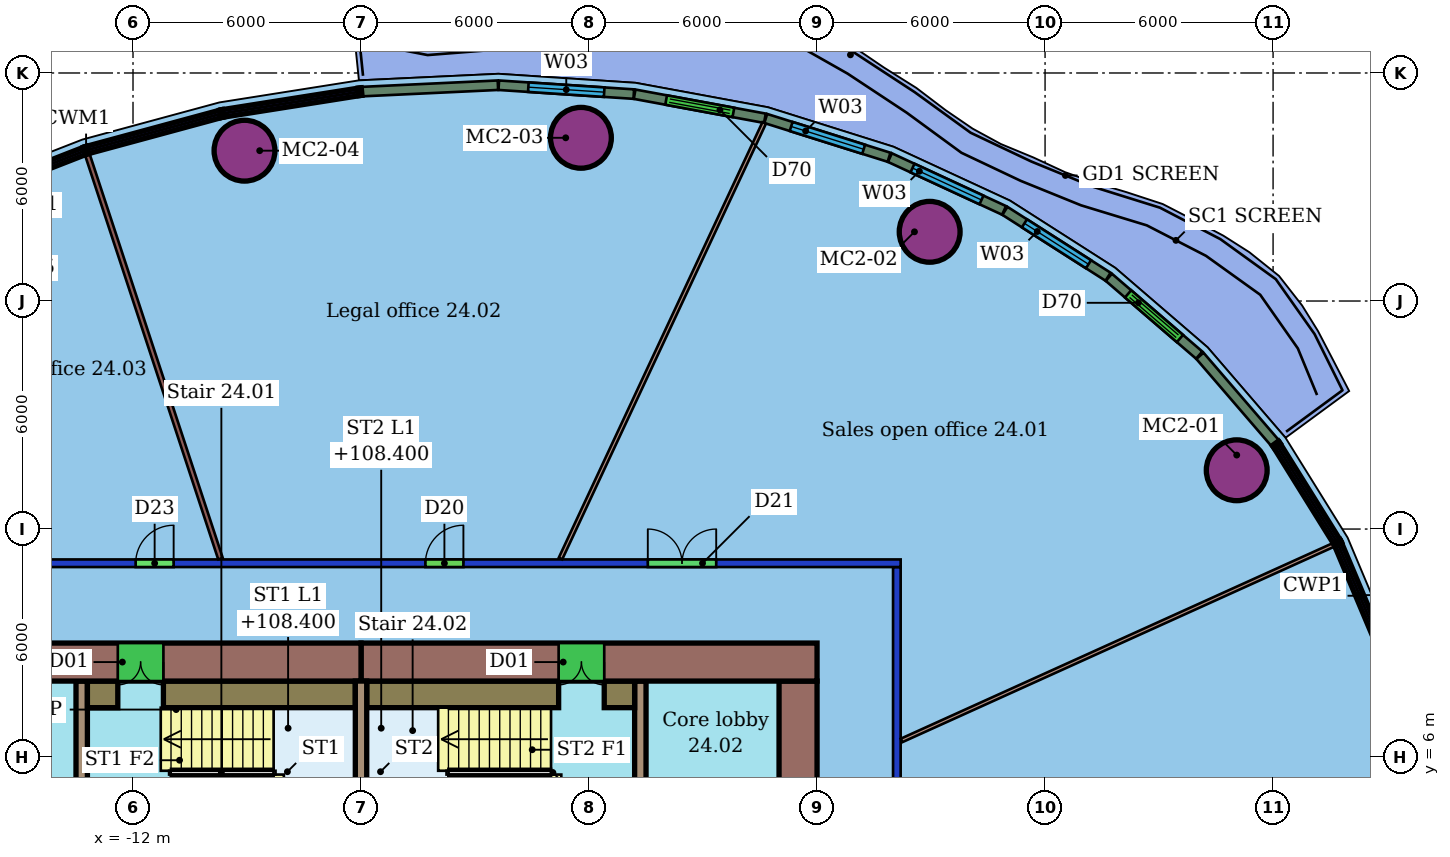
"""IFC4 building model, lengths in metres.
Left out: names, types, materials, properties, quantities, classifications, styles, units other than length and angle.
Written with IfcOpenShell. Run it as: python <this file> out.ifc"""

import sys

from ifc_helpers import new_model, si_unit, direction, frame, frame_2d, origin, origin_2d, place, context, subcontext, project, spatial, rectangle, hollow_circle, extrude, element, fill, save


model = new_model("IFC4")
c1 = context("Model", 3, precision=1e-05, world=origin(), true_north=direction((0.0, 1.0)))
c2 = subcontext(c1, "Body", "Model", "MODEL_VIEW")
j1 = project(units=[si_unit("LENGTHUNIT", "METRE"), si_unit("PLANEANGLEUNIT", "RADIAN")], contexts=[c1])
p1 = place(None, origin())
s1 = spatial("IfcSite", under=j1, at=p1, CompositionType="ELEMENT")
p2 = place(p1, origin())
s2 = spatial("IfcBuilding", under=s1, at=p2, CompositionType="ELEMENT")
p3 = place(p2, frame((0.0, 0.0, 106.6)))
s3 = spatial("IfcBuildingStorey", under=s2, at=p3, CompositionType="ELEMENT", Elevation=106.6)
for number, where, z_axis, x_axis in (
    (1, (17.043, 13.547, 0.0), (0.0, 0.0, 1.0), (1.0, 0.0, 0.0)),
    (2, (8.963, 19.821, 0.0), (0.0, 0.0, 1.0), (1.0, 0.0, 0.0)),
    (3, (-0.213, 22.294, 0.0), (0.0, 0.0, 1.0), (1.0, 0.0, 0.0)),
    (4, (-9.066, 21.956, 0.0), (0.0, 0.0, 1.0), (1.0, 0.0, 0.0)),
):
    element("IfcColumn", number, at=place(p3, frame(where, z_axis=z_axis, x_axis=x_axis)), inside=s3, PredefinedType="COLUMN", context=c2, shape_type="SweptSolid", body=[
        extrude(hollow_circle(Radius=0.8, WallThickness=0.055, at=origin_2d()), origin(), (0.0, 0.0, 1.0), 3.45),
    ])
p4 = place(p3, frame((-20.2, 11.1, 0.0), z_axis=(0.0, 0.0, 1.0), x_axis=(1.0, 0.0, 0.0)))
e5 = element("IfcWall", 5, at=p4, inside=s3, PredefinedType="PARTITIONING", context=c2, shape_type="SweptSolid", body=[
    extrude(rectangle(XDim=28.4, YDim=0.2, at=frame_2d((14.2, 0.0))), origin(), (0.0, 0.0, 1.0), 3.0),
])
p5 = place(p4, frame((21.746, 0.0, 0.0)))
e6 = element("IfcOpeningElement", 6, at=p5, cuts=e5, PredefinedType="OPENING", context=c2, shape_type="SweptSolid", body=[
    extrude(rectangle(XDim=1.8, YDim=2.1, at=frame_2d((0.9, 1.05))), frame((0.0, 0.11, 0.0), z_axis=(0.0, -1.0, 0.0), x_axis=(1.0, 0.0, 0.0)), (0.0, 0.0, 1.0), 0.22),
])
p6 = place(p4, frame((15.894, 0.0, 0.0)))
e7 = element("IfcOpeningElement", 7, at=p6, cuts=e5, PredefinedType="OPENING", context=c2, shape_type="SweptSolid", body=[
    extrude(rectangle(XDim=1.0, YDim=2.1, at=frame_2d((0.5, 1.05))), frame((0.0, 0.11, 0.0), z_axis=(0.0, -1.0, 0.0), x_axis=(1.0, 0.0, 0.0)), (0.0, 0.0, 1.0), 0.22),
])
p7 = place(p4, frame((8.27, 0.0, 0.0)))
e8 = element("IfcOpeningElement", 8, at=p7, cuts=e5, PredefinedType="OPENING", context=c2, shape_type="SweptSolid", body=[
    extrude(rectangle(XDim=1.0, YDim=2.4, at=frame_2d((0.5, 1.2))), frame((0.0, 0.11, 0.0), z_axis=(0.0, -1.0, 0.0), x_axis=(1.0, 0.0, 0.0)), (0.0, 0.0, 1.0), 0.22),
])
p8 = place(p4, frame((3.349, 0.0, 0.0)))
e9 = element("IfcOpeningElement", 9, at=p8, cuts=e5, PredefinedType="OPENING", context=c2, shape_type="SweptSolid", body=[
    extrude(rectangle(XDim=0.9, YDim=2.1, at=frame_2d((0.45, 1.05))), frame((0.0, 0.11, 0.0), z_axis=(0.0, -1.0, 0.0), x_axis=(1.0, 0.0, 0.0)), (0.0, 0.0, 1.0), 0.22),
])
p9 = place(p3, frame((8.1, 11.0, 0.0), z_axis=(0.0, 0.0, 1.0), x_axis=(0.0, -1.0, 0.0)))
e10 = element("IfcWall", 10, at=p9, inside=s3, PredefinedType="PARTITIONING", context=c2, shape_type="SweptSolid", body=[
    extrude(rectangle(XDim=22.0, YDim=0.2, at=frame_2d((11.0, 0.0))), origin(), (0.0, 0.0, 1.0), 3.0),
])
p10 = place(p9, frame((14.236, 0.0, 0.0)))
e11 = element("IfcOpeningElement", 11, at=p10, cuts=e10, PredefinedType="OPENING", context=c2, shape_type="SweptSolid", body=[
    extrude(rectangle(XDim=1.5, YDim=2.1, at=frame_2d((0.75, 1.05))), frame((0.0, 0.11, 0.0), z_axis=(0.0, -1.0, 0.0), x_axis=(1.0, 0.0, 0.0)), (0.0, 0.0, 1.0), 0.22),
])
p11 = place(p9, frame((6.648, 0.0, 0.0)))
e12 = element("IfcOpeningElement", 12, at=p11, cuts=e10, PredefinedType="OPENING", context=c2, shape_type="SweptSolid", body=[
    extrude(rectangle(XDim=1.8, YDim=2.1, at=frame_2d((0.9, 1.05))), frame((0.0, 0.11, 0.0), z_axis=(0.0, -1.0, 0.0), x_axis=(1.0, 0.0, 0.0)), (0.0, 0.0, 1.0), 0.22),
])
p12 = place(p3, frame((19.584, 11.58, 0.0), z_axis=(0.0, 0.0, 1.0), x_axis=(-0.911028274582, -0.412343889142, 0.0)))
e13 = element("IfcWall", 13, at=p12, inside=s3, PredefinedType="PARTITIONING", context=c2, shape_type="SweptSolid", body=[
    extrude(rectangle(XDim=12.473, YDim=0.1, at=frame_2d((6.236, 0.0))), origin(), (0.0, 0.0, 1.0), 3.45),
])
p13 = place(p3, frame((4.609, 22.685, 0.0), z_axis=(0.0, 0.0, 1.0), x_axis=(-0.423609796587, -0.90584476608, 0.0)))
e14 = element("IfcWall", 14, at=p13, inside=s3, PredefinedType="PARTITIONING", context=c2, shape_type="SweptSolid", body=[
    extrude(rectangle(XDim=12.656, YDim=0.1, at=frame_2d((6.328, 0.0))), origin(), (0.0, 0.0, 1.0), 3.45),
])
p14 = place(p3, frame((-13.199, 21.845, 0.0), z_axis=(0.0, 0.0, 1.0), x_axis=(0.31298520813, -0.949758000489, 0.0)))
e15 = element("IfcWall", 15, at=p14, inside=s3, PredefinedType="PARTITIONING", context=c2, shape_type="SweptSolid", body=[
    extrude(rectangle(XDim=11.187, YDim=0.125, at=frame_2d((5.594, 0.0))), origin(), (0.0, 0.0, 1.0), 3.45),
])
p15 = place(p3, frame((18.05, 14.265, 0.0), z_axis=(0.0, 0.0, 1.0), x_axis=(-0.652642781227, 0.757665757516, 0.0)))
e16 = element("IfcWall", 16, at=p15, inside=s3, PredefinedType="SOLIDWALL", context=c2, shape_type="SweptSolid", body=[
    extrude(rectangle(XDim=3.027, YDim=0.25, at=frame_2d((1.513, 0.0))), origin(), (0.0, 0.0, 1.0), 3.05),
])
p16 = place(p3, frame((16.056, 16.577, 0.0), z_axis=(0.0, 0.0, 1.0), x_axis=(-0.757892764479, 0.652379151683, 0.0)))
e17 = element("IfcWall", 17, at=p16, inside=s3, PredefinedType="SOLIDWALL", context=c2, shape_type="SweptSolid", body=[
    extrude(rectangle(XDim=3.137, YDim=0.25, at=frame_2d((1.569, 0.0))), origin(), (0.0, 0.0, 1.0), 3.05),
])
p17 = place(p16, frame((0.669, 0.0, 0.0)))
e18 = element("IfcOpeningElement", 18, at=p17, cuts=e17, PredefinedType="OPENING", context=c2, shape_type="SweptSolid", body=[
    extrude(rectangle(XDim=1.8, YDim=2.4, at=frame_2d((0.9, 1.2))), frame((0.0, 0.135, 0.0), z_axis=(0.0, -1.0, 0.0), x_axis=(1.0, 0.0, 0.0)), (0.0, 0.0, 1.0), 0.27),
])
p18 = place(p3, frame((13.657, 18.639, 0.0), z_axis=(0.0, 0.0, 1.0), x_axis=(-0.842783191824, 0.538253185387, 0.0)))
e19 = element("IfcWall", 19, at=p18, inside=s3, PredefinedType="SOLIDWALL", context=c2, shape_type="SweptSolid", body=[
    extrude(rectangle(XDim=3.22, YDim=0.25, at=frame_2d((1.61, 0.0))), origin(), (0.0, 0.0, 1.0), 3.05),
])
p19 = place(p18, frame((0.61, 0.0, 0.9)))
e20 = element("IfcOpeningElement", 20, at=p19, cuts=e19, PredefinedType="OPENING", context=c2, shape_type="SweptSolid", body=[
    extrude(rectangle(XDim=2.0, YDim=2.1, at=frame_2d((1.0, 1.05))), frame((0.0, 0.135, 0.0), z_axis=(0.0, -1.0, 0.0), x_axis=(1.0, 0.0, 0.0)), (0.0, 0.0, 1.0), 0.27),
])
p20 = place(p3, frame((10.921, 20.385, 0.0), z_axis=(0.0, 0.0, 1.0), x_axis=(-0.907654786829, 0.419717509697, 0.0)))
e21 = element("IfcWall", 21, at=p20, inside=s3, PredefinedType="SOLIDWALL", context=c2, shape_type="SweptSolid", body=[
    extrude(rectangle(XDim=3.31, YDim=0.25, at=frame_2d((1.655, 0.0))), origin(), (0.0, 0.0, 1.0), 3.05),
])
p21 = place(p20, frame((0.655, 0.0, 0.9)))
e22 = element("IfcOpeningElement", 22, at=p21, cuts=e21, PredefinedType="OPENING", context=c2, shape_type="SweptSolid", body=[
    extrude(rectangle(XDim=2.0, YDim=2.1, at=frame_2d((1.0, 1.05))), frame((0.0, 0.135, 0.0), z_axis=(0.0, -1.0, 0.0), x_axis=(1.0, 0.0, 0.0)), (0.0, 0.0, 1.0), 0.27),
])
p22 = place(p3, frame((7.894, 21.782, 0.0), z_axis=(0.0, 0.0, 1.0), x_axis=(-0.953916243861, 0.300072990618, 0.0)))
e23 = element("IfcWall", 23, at=p22, inside=s3, PredefinedType="SOLIDWALL", context=c2, shape_type="SweptSolid", body=[
    extrude(rectangle(XDim=3.401, YDim=0.25, at=frame_2d((1.7, 0.0))), origin(), (0.0, 0.0, 1.0), 3.05),
])
p23 = place(p22, frame((0.7, 0.0, 0.9)))
e24 = element("IfcOpeningElement", 24, at=p23, cuts=e23, PredefinedType="OPENING", context=c2, shape_type="SweptSolid", body=[
    extrude(rectangle(XDim=2.0, YDim=2.1, at=frame_2d((1.0, 1.05))), frame((0.0, 0.135, 0.0), z_axis=(0.0, -1.0, 0.0), x_axis=(1.0, 0.0, 0.0)), (0.0, 0.0, 1.0), 0.27),
])
p24 = place(p3, frame((4.628, 22.809, 0.0), z_axis=(0.0, 0.0, 1.0), x_axis=(-0.983371983657, 0.181602703057, 0.0)))
e25 = element("IfcWall", 25, at=p24, inside=s3, PredefinedType="SOLIDWALL", context=c2, shape_type="SweptSolid", body=[
    extrude(rectangle(XDim=3.486, YDim=0.25, at=frame_2d((1.743, 0.0))), origin(), (0.0, 0.0, 1.0), 3.05),
])
p25 = place(p24, frame((0.843, 0.0, 0.0)))
e26 = element("IfcOpeningElement", 26, at=p25, cuts=e25, PredefinedType="OPENING", context=c2, shape_type="SweptSolid", body=[
    extrude(rectangle(XDim=1.8, YDim=2.4, at=frame_2d((0.9, 1.2))), frame((0.0, 0.135, 0.0), z_axis=(0.0, -1.0, 0.0), x_axis=(1.0, 0.0, 0.0)), (0.0, 0.0, 1.0), 0.27),
])
p26 = place(p3, frame((1.177, 23.444, 0.0), z_axis=(0.0, 0.0, 1.0), x_axis=(-0.997840034655, 0.065690678477, 0.0)))
e27 = element("IfcWall", 27, at=p26, inside=s3, PredefinedType="SOLIDWALL", context=c2, shape_type="SweptSolid", body=[
    extrude(rectangle(XDim=3.56, YDim=0.25, at=frame_2d((1.78, 0.0))), origin(), (0.0, 0.0, 1.0), 3.05),
])
p27 = place(p26, frame((0.78, 0.0, 0.9)))
e28 = element("IfcOpeningElement", 28, at=p27, cuts=e27, PredefinedType="OPENING", context=c2, shape_type="SweptSolid", body=[
    extrude(rectangle(XDim=2.0, YDim=2.1, at=frame_2d((1.0, 1.05))), frame((0.0, 0.135, 0.0), z_axis=(0.0, -1.0, 0.0), x_axis=(1.0, 0.0, 0.0)), (0.0, 0.0, 1.0), 0.27),
])
p28 = place(p3, frame((-2.398, 23.678, 0.0), z_axis=(0.0, 0.0, 1.0), x_axis=(-0.998893022407, -0.047039661844, 0.0)))
e29 = element("IfcWall", 29, at=p28, inside=s3, PredefinedType="SOLIDWALL", context=c2, shape_type="SweptSolid", body=[
    extrude(rectangle(XDim=3.576, YDim=0.25, at=frame_2d((1.788, 0.0))), origin(), (0.0, 0.0, 1.0), 3.05),
])
p29 = place(p3, frame((6.0, 8.5, 0.0), z_axis=(0.0, 0.0, 1.0), x_axis=(-1.0, 0.0, 0.0)))
e30 = element("IfcWall", 30, at=p29, inside=s3, PredefinedType="SHEAR", context=c2, shape_type="SweptSolid", body=[
    extrude(rectangle(XDim=12.0, YDim=1.0, at=frame_2d((6.0, 0.0))), origin(), (0.0, 0.0, 1.0), 3.3),
])
p30 = place(p29, frame((5.6, 0.0, 0.0)))
e31 = element("IfcOpeningElement", 31, at=p30, cuts=e30, PredefinedType="OPENING", context=c2, shape_type="SweptSolid", body=[
    extrude(rectangle(XDim=1.2, YDim=2.1, at=frame_2d((0.6, 1.05))), frame((0.0, 0.51, 0.0), z_axis=(0.0, -1.0, 0.0), x_axis=(1.0, 0.0, 0.0)), (0.0, 0.0, 1.0), 1.02),
])
p31 = place(p3, frame((-6.0, 8.5, 0.0), z_axis=(0.0, 0.0, 1.0), x_axis=(-1.0, 0.0, 0.0)))
e32 = element("IfcWall", 32, at=p31, inside=s3, PredefinedType="SHEAR", context=c2, shape_type="SweptSolid", body=[
    extrude(rectangle(XDim=12.0, YDim=1.0, at=frame_2d((6.0, 0.0))), origin(), (0.0, 0.0, 1.0), 3.3),
])
p32 = place(p31, frame((5.2, 0.0, 0.0)))
e33 = element("IfcOpeningElement", 33, at=p32, cuts=e32, PredefinedType="OPENING", context=c2, shape_type="SweptSolid", body=[
    extrude(rectangle(XDim=1.2, YDim=2.1, at=frame_2d((0.6, 1.05))), frame((0.0, 0.51, 0.0), z_axis=(0.0, -1.0, 0.0), x_axis=(1.0, 0.0, 0.0)), (0.0, 0.0, 1.0), 1.02),
])
p33 = place(p3, frame((5.5, -8.0, 0.0), z_axis=(0.0, 0.0, 1.0), x_axis=(0.0, 1.0, 0.0)))
e34 = element("IfcWall", 34, at=p33, inside=s3, PredefinedType="SHEAR", context=c2, shape_type="SweptSolid", body=[
    extrude(rectangle(XDim=16.0, YDim=1.0, at=frame_2d((8.0, 0.0))), origin(), (0.0, 0.0, 1.0), 3.3),
])
p34 = place(p33, frame((2.9, 0.0, 0.0)))
e35 = element("IfcOpeningElement", 35, at=p34, cuts=e34, PredefinedType="OPENING", context=c2, shape_type="SweptSolid", body=[
    extrude(rectangle(XDim=1.2, YDim=2.1, at=frame_2d((0.6, 1.05))), frame((0.0, 0.51, 0.0), z_axis=(0.0, -1.0, 0.0), x_axis=(1.0, 0.0, 0.0)), (0.0, 0.0, 1.0), 1.02),
])
p35 = place(p33, frame((11.9, 0.0, 0.0)))
e36 = element("IfcOpeningElement", 36, at=p35, cuts=e34, PredefinedType="OPENING", context=c2, shape_type="SweptSolid", body=[
    extrude(rectangle(XDim=1.2, YDim=2.1, at=frame_2d((0.6, 1.05))), frame((0.0, 0.51, 0.0), z_axis=(0.0, -1.0, 0.0), x_axis=(1.0, 0.0, 0.0)), (0.0, 0.0, 1.0), 1.02),
])
p36 = place(p3, frame((-13.35, 8.0, 0.0), z_axis=(0.0, 0.0, 1.0), x_axis=(0.0, -1.0, 0.0)))
e37 = element("IfcWall", 37, at=p36, inside=s3, PredefinedType="SHEAR", context=c2, shape_type="SweptSolid", body=[
    extrude(rectangle(XDim=16.0, YDim=0.3, at=frame_2d((8.0, 0.0))), origin(), (0.0, 0.0, 1.0), 3.3),
])
p37 = place(p36, frame((7.25, 0.0, 0.0)))
e38 = element("IfcOpeningElement", 38, at=p37, cuts=e37, PredefinedType="OPENING", context=c2, shape_type="SweptSolid", body=[
    extrude(rectangle(XDim=1.5, YDim=2.1, at=frame_2d((0.75, 1.05))), frame((0.0, 0.16, 0.0), z_axis=(0.0, -1.0, 0.0), x_axis=(1.0, 0.0, 0.0)), (0.0, 0.0, 1.0), 0.32),
])
p38 = place(p3, frame((1.35, -8.0, 0.0), z_axis=(0.0, 0.0, 1.0), x_axis=(0.0, 1.0, 0.0)))
e39 = element("IfcWall", 39, at=p38, inside=s3, PredefinedType="SHEAR", context=c2, shape_type="SweptSolid", body=[
    extrude(rectangle(XDim=16.0, YDim=0.3, at=frame_2d((8.0, 0.0))), origin(), (0.0, 0.0, 1.0), 3.3),
])
p39 = place(p38, frame((1.91, 0.0, 0.0)))
e40 = element("IfcOpeningElement", 40, at=p39, cuts=e39, PredefinedType="OPENING", context=c2, shape_type="SweptSolid", body=[
    extrude(rectangle(XDim=1.0, YDim=2.1, at=frame_2d((0.5, 1.05))), frame((0.0, 0.16, 0.0), z_axis=(0.0, -1.0, 0.0), x_axis=(1.0, 0.0, 0.0)), (0.0, 0.0, 1.0), 0.32),
])
p40 = place(p38, frame((7.25, 0.0, 0.0)))
e41 = element("IfcOpeningElement", 41, at=p40, cuts=e39, PredefinedType="OPENING", context=c2, shape_type="SweptSolid", body=[
    extrude(rectangle(XDim=1.5, YDim=2.1, at=frame_2d((0.75, 1.05))), frame((0.0, 0.16, 0.0), z_axis=(0.0, -1.0, 0.0), x_axis=(1.0, 0.0, 0.0)), (0.0, 0.0, 1.0), 0.32),
])
p41 = place(p3, frame((-6.0, 3.88, 0.0), z_axis=(0.0, 0.0, 1.0), x_axis=(0.0, 1.0, 0.0)))
e42 = element("IfcWall", 42, at=p41, inside=s3, PredefinedType="SHEAR", context=c2, shape_type="SweptSolid", body=[
    extrude(rectangle(XDim=4.12, YDim=0.3, at=frame_2d((2.06, 0.0))), origin(), (0.0, 0.0, 1.0), 3.3),
])
p42 = place(p3, frame((-13.2, 7.65, 0.0), z_axis=(0.0, 0.0, 1.0), x_axis=(1.0, 0.0, 0.0)))
e43 = element("IfcWall", 43, at=p42, inside=s3, PredefinedType="SHEAR", context=c2, shape_type="SweptSolid", body=[
    extrude(rectangle(XDim=0.8, YDim=0.7, at=frame_2d((0.4, 0.0))), origin(), (0.0, 0.0, 1.0), 3.3),
])
for number, where, z_axis, x_axis in (
    (44, (-11.2, 7.65, 0.0), (0.0, 0.0, 1.0), (1.0, 0.0, 0.0)),
    (45, (-5.85, 7.65, 0.0), (0.0, 0.0, 1.0), (1.0, 0.0, 0.0)),
):
    element("IfcWall", number, at=place(p3, frame(where, z_axis=z_axis, x_axis=x_axis)), inside=s3, PredefinedType="SHEAR", context=c2, shape_type="SweptSolid", body=[
        extrude(rectangle(XDim=5.05, YDim=0.7, at=frame_2d((2.525, 0.0))), origin(), (0.0, 0.0, 1.0), 3.3),
    ])
p43 = place(p3, frame((0.4, 7.65, 0.0), z_axis=(0.0, 0.0, 1.0), x_axis=(1.0, 0.0, 0.0)))
e46 = element("IfcWall", 46, at=p43, inside=s3, PredefinedType="SHEAR", context=c2, shape_type="SweptSolid", body=[
    extrude(rectangle(XDim=0.8, YDim=0.7, at=frame_2d((0.4, 0.0))), origin(), (0.0, 0.0, 1.0), 3.3),
])
p44 = place(p5, origin())
e47 = element("IfcDoor", 47, at=p44, inside=s3, OperationType="DOUBLE_DOOR_SINGLE_SWING", PredefinedType="DOOR", context=c2, shape_type="SweptSolid", body=[
    extrude(rectangle(XDim=1.8, YDim=2.1, at=frame_2d((0.9, 1.05))), frame((0.0, 0.025, 0.0), z_axis=(0.0, -1.0, 0.0), x_axis=(1.0, 0.0, 0.0)), (0.0, 0.0, 1.0), 0.05),
])
fill(e6, e47)
p45 = place(p6, origin())
e48 = element("IfcDoor", 48, at=p45, inside=s3, OperationType="SINGLE_SWING_RIGHT", PredefinedType="DOOR", context=c2, shape_type="SweptSolid", body=[
    extrude(rectangle(XDim=1.0, YDim=2.1, at=frame_2d((0.5, 1.05))), frame((0.0, 0.025, 0.0), z_axis=(0.0, -1.0, 0.0), x_axis=(1.0, 0.0, 0.0)), (0.0, 0.0, 1.0), 0.05),
])
fill(e7, e48)
p46 = place(p7, origin())
e49 = element("IfcDoor", 49, at=p46, inside=s3, OperationType="SINGLE_SWING_RIGHT", PredefinedType="DOOR", context=c2, shape_type="SweptSolid", body=[
    extrude(rectangle(XDim=1.0, YDim=2.4, at=frame_2d((0.5, 1.2))), frame((0.0, 0.025, 0.0), z_axis=(0.0, -1.0, 0.0), x_axis=(1.0, 0.0, 0.0)), (0.0, 0.0, 1.0), 0.05),
])
fill(e8, e49)
p47 = place(p17, origin())
e50 = element("IfcDoor", 50, at=p47, inside=s3, OperationType="DOUBLE_DOOR_SLIDING", PredefinedType="DOOR", context=c2, shape_type="SweptSolid", body=[
    extrude(rectangle(XDim=1.8, YDim=2.4, at=frame_2d((0.9, 1.2))), frame((0.0, 0.025, 0.0), z_axis=(0.0, -1.0, 0.0), x_axis=(1.0, 0.0, 0.0)), (0.0, 0.0, 1.0), 0.05),
])
fill(e18, e50)
p48 = place(p19, origin())
e51 = element("IfcWindow", 51, at=p48, inside=s3, PartitioningType="SINGLE_PANEL", PredefinedType="WINDOW", context=c2, shape_type="SweptSolid", body=[
    extrude(rectangle(XDim=2.0, YDim=2.1, at=frame_2d((1.0, 1.05))), frame((0.0, 0.03, 0.0), z_axis=(0.0, -1.0, 0.0), x_axis=(1.0, 0.0, 0.0)), (0.0, 0.0, 1.0), 0.06),
])
fill(e20, e51)
p49 = place(p21, origin())
e52 = element("IfcWindow", 52, at=p49, inside=s3, PartitioningType="SINGLE_PANEL", PredefinedType="WINDOW", context=c2, shape_type="SweptSolid", body=[
    extrude(rectangle(XDim=2.0, YDim=2.1, at=frame_2d((1.0, 1.05))), frame((0.0, 0.03, 0.0), z_axis=(0.0, -1.0, 0.0), x_axis=(1.0, 0.0, 0.0)), (0.0, 0.0, 1.0), 0.06),
])
fill(e22, e52)
p50 = place(p23, origin())
e53 = element("IfcWindow", 53, at=p50, inside=s3, PartitioningType="SINGLE_PANEL", PredefinedType="WINDOW", context=c2, shape_type="SweptSolid", body=[
    extrude(rectangle(XDim=2.0, YDim=2.1, at=frame_2d((1.0, 1.05))), frame((0.0, 0.03, 0.0), z_axis=(0.0, -1.0, 0.0), x_axis=(1.0, 0.0, 0.0)), (0.0, 0.0, 1.0), 0.06),
])
fill(e24, e53)
p51 = place(p25, origin())
e54 = element("IfcDoor", 54, at=p51, inside=s3, OperationType="DOUBLE_DOOR_SLIDING", PredefinedType="DOOR", context=c2, shape_type="SweptSolid", body=[
    extrude(rectangle(XDim=1.8, YDim=2.4, at=frame_2d((0.9, 1.2))), frame((0.0, 0.025, 0.0), z_axis=(0.0, -1.0, 0.0), x_axis=(1.0, 0.0, 0.0)), (0.0, 0.0, 1.0), 0.05),
])
fill(e26, e54)
p52 = place(p27, origin())
e55 = element("IfcWindow", 55, at=p52, inside=s3, PartitioningType="SINGLE_PANEL", PredefinedType="WINDOW", context=c2, shape_type="SweptSolid", body=[
    extrude(rectangle(XDim=2.0, YDim=2.1, at=frame_2d((1.0, 1.05))), frame((0.0, 0.03, 0.0), z_axis=(0.0, -1.0, 0.0), x_axis=(1.0, 0.0, 0.0)), (0.0, 0.0, 1.0), 0.06),
])
fill(e28, e55)
p53 = place(p30, origin())
e56 = element("IfcDoor", 56, at=p53, inside=s3, OperationType="DOUBLE_DOOR_SINGLE_SWING", PredefinedType="NOTDEFINED", context=c2, shape_type="SweptSolid", body=[
    extrude(rectangle(XDim=1.2, YDim=2.1, at=frame_2d((0.6, 1.05))), frame((0.0, 0.025, 0.0), z_axis=(0.0, -1.0, 0.0), x_axis=(1.0, 0.0, 0.0)), (0.0, 0.0, 1.0), 0.05),
])
fill(e31, e56)
p54 = place(p32, origin())
e57 = element("IfcDoor", 57, at=p54, inside=s3, OperationType="DOUBLE_DOOR_SINGLE_SWING", PredefinedType="NOTDEFINED", context=c2, shape_type="SweptSolid", body=[
    extrude(rectangle(XDim=1.2, YDim=2.1, at=frame_2d((0.6, 1.05))), frame((0.0, 0.025, 0.0), z_axis=(0.0, -1.0, 0.0), x_axis=(1.0, 0.0, 0.0)), (0.0, 0.0, 1.0), 0.05),
])
fill(e33, e57)
save(model, sys.argv[1])
